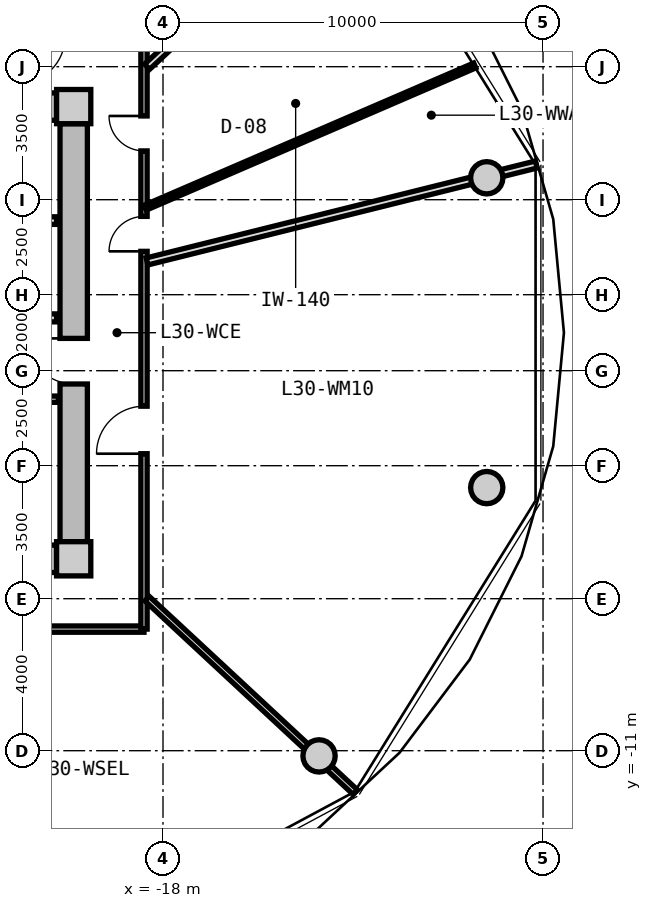
"""IFC4 building model, lengths in metres.
Left out: names, types, materials, properties, quantities, classifications, styles, units other than length and angle.
Written with IfcOpenShell. Run it as: python <this file> out.ifc"""

import sys

from ifc_helpers import new_model, si_unit, direction, frame, frame_2d, origin, origin_2d, place, context, subcontext, project, spatial, rectangle, circle, extrude, source, transform, mapped, element, fill, save


model = new_model("IFC4")
c1 = context("Model", 3, precision=1e-05, world=origin(), true_north=direction((0.0, 1.0)))
c2 = subcontext(c1, "Body", "Model", "MODEL_VIEW")
j1 = project(units=[si_unit("LENGTHUNIT", "METRE"), si_unit("PLANEANGLEUNIT", "RADIAN")], contexts=[c1])
p1 = place(None, origin())
s1 = spatial("IfcSite", under=j1, at=p1, CompositionType="ELEMENT")
p2 = place(p1, origin())
s2 = spatial("IfcBuilding", under=s1, at=p2, CompositionType="ELEMENT")
p3 = place(p2, frame((0.0, 0.0, 99.3)))
s3 = spatial("IfcBuildingStorey", under=s2, at=p3, CompositionType="ELEMENT", Elevation=99.3)
m1 = source(origin(), c2, "Body", "SweptSolid", [
    extrude(rectangle(XDim=0.9, YDim=0.9, at=origin_2d()), origin(), (0.0, 0.0, 1.0), 3.05),
])
for number, where, z_axis, x_axis in (
    (1, (-20.35, -5.95, 0.0), (0.0, 0.0, 1.0), (1.0, 0.0, 0.0)),
    (2, (-20.35, 5.95, 0.0), (0.0, 0.0, 1.0), (1.0, 0.0, 0.0)),
):
    element("IfcColumn", number, at=place(p3, frame(where, z_axis=z_axis, x_axis=x_axis)), inside=s3, PredefinedType="COLUMN", context=c2, shape_type="MappedRepresentation", body=[
        mapped(m1, transform((0.0, 0.0, 0.0), x_axis=(1.0, 0.0, 0.0), y_axis=(0.0, 1.0, 0.0), z_axis=(0.0, 0.0, 1.0), scale=1.0)),
    ])
m2 = source(origin(), c2, "Body", "SweptSolid", [
    extrude(rectangle(XDim=14.4, YDim=0.72, at=frame_2d((7.2, 0.0))), origin(), (0.0, 0.0, 1.0), 2.79),
])
for number, where, z_axis, x_axis in (
    (3, (-35.2, 5.95, 0.0), (0.0, 0.0, 1.0), (1.0, 0.0, 0.0)),
    (4, (-20.8, -5.95, 0.0), (0.0, 0.0, 1.0), (-1.0, 0.0, 0.0)),
):
    element("IfcWall", number, at=place(p3, frame(where, z_axis=z_axis, x_axis=x_axis)), inside=s3, PredefinedType="SHEAR", context=c2, shape_type="MappedRepresentation", body=[
        mapped(m2, transform((0.0, 0.0, 0.0), x_axis=(1.0, 0.0, 0.0), y_axis=(0.0, 1.0, 0.0), z_axis=(0.0, 0.0, 1.0), scale=1.0)),
    ])
m3 = source(origin(), c2, "Body", "SweptSolid", [
    extrude(rectangle(XDim=11.0, YDim=0.72, at=frame_2d((5.5, 0.0))), origin(), (0.0, 0.0, 1.0), 2.79),
])
p4 = place(p3, frame((-20.35, 5.5, 0.0), z_axis=(0.0, 0.0, 1.0), x_axis=(0.0, -1.0, 0.0)))
e5 = element("IfcWall", 5, at=p4, inside=s3, PredefinedType="SHEAR", context=c2, shape_type="MappedRepresentation", body=[
    mapped(m3, transform((0.0, 0.0, 0.0), x_axis=(1.0, 0.0, 0.0), y_axis=(0.0, 1.0, 0.0), z_axis=(0.0, 0.0, 1.0), scale=1.0)),
])
p5 = place(p4, frame((5.65, 0.0, 0.0)))
e6 = element("IfcOpeningElement", 6, at=p5, cuts=e5, PredefinedType="OPENING", context=c2, shape_type="SweptSolid", body=[
    extrude(rectangle(XDim=1.2, YDim=2.15, at=frame_2d((0.6, 1.075))), frame((0.0, 0.37, 0.0), z_axis=(0.0, -1.0, 0.0), x_axis=(1.0, 0.0, 0.0)), (0.0, 0.0, 1.0), 0.74),
])
m4 = source(origin(), c2, "Body", "SweptSolid", [
    extrude(circle(Radius=0.425, at=origin_2d()), origin(), (0.0, 0.0, 1.0), 3.05),
])
for number, where, z_axis, x_axis in (
    (7, (-9.481, 4.076, 0.0), (0.0, 0.0, 1.0), (1.0, 0.0, 0.0)),
    (8, (-13.894, -11.137, 0.0), (0.0, 0.0, 1.0), (1.0, 0.0, 0.0)),
    (9, (-9.481, -4.076, 0.0), (0.0, 0.0, 1.0), (1.0, 0.0, 0.0)),
):
    element("IfcColumn", number, at=place(p3, frame(where, z_axis=z_axis, x_axis=x_axis)), inside=s3, PredefinedType="COLUMN", context=c2, shape_type="MappedRepresentation", body=[
        mapped(m4, transform((0.0, 0.0, 0.0), x_axis=(1.0, 0.0, 0.0), y_axis=(0.0, 1.0, 0.0), z_axis=(0.0, 0.0, 1.0), scale=1.0)),
    ])
m5 = source(origin(), c2, "Body", "SweptSolid", [
    extrude(rectangle(XDim=3.2, YDim=0.2, at=frame_2d((1.6, 0.0))), origin(), (0.0, 0.0, 1.0), 2.775),
])
p6 = place(p3, frame((-24.0, 2.95, 0.0), z_axis=(0.0, 0.0, 1.0), x_axis=(1.0, 0.0, 0.0)))
e10 = element("IfcWall", 10, at=p6, inside=s3, PredefinedType="PARTITIONING", context=c2, shape_type="MappedRepresentation", body=[
    mapped(m5, transform((0.0, 0.0, 0.0), x_axis=(1.0, 0.0, 0.0), y_axis=(0.0, 1.0, 0.0), z_axis=(0.0, 0.0, 1.0), scale=1.0)),
])
m6 = source(origin(), c2, "Body", "SweptSolid", [
    extrude(rectangle(XDim=6.66, YDim=0.21, at=frame_2d((3.33, 0.0))), origin(), (0.0, 0.0, 1.0), 2.775),
])
p7 = place(p3, frame((-27.46, 0.39, 0.0), z_axis=(0.0, 0.0, 1.0), x_axis=(1.0, 0.0, 0.0)))
e11 = element("IfcWall", 11, at=p7, inside=s3, PredefinedType="PARTITIONING", context=c2, shape_type="MappedRepresentation", body=[
    mapped(m6, transform((0.0, 0.0, 0.0), x_axis=(1.0, 0.0, 0.0), y_axis=(0.0, 1.0, 0.0), z_axis=(0.0, 0.0, 1.0), scale=1.0)),
])
p8 = place(p7, frame((1.0, 0.0, 0.0)))
e12 = element("IfcOpeningElement", 12, at=p8, cuts=e11, PredefinedType="OPENING", context=c2, shape_type="SweptSolid", body=[
    extrude(rectangle(XDim=1.2, YDim=2.15, at=frame_2d((0.6, 1.075))), frame((0.0, 0.115, 0.0), z_axis=(0.0, -1.0, 0.0), x_axis=(1.0, 0.0, 0.0)), (0.0, 0.0, 1.0), 0.23),
])
m7 = source(origin(), c2, "Body", "SweptSolid", [
    extrude(rectangle(XDim=2.7, YDim=0.165, at=frame_2d((1.35, 0.0))), origin(), (0.0, 0.0, 1.0), 2.775),
])
p9 = place(p3, frame((-23.45, -1.75, 0.0), z_axis=(0.0, 0.0, 1.0), x_axis=(1.0, 0.0, 0.0)))
e13 = element("IfcWall", 13, at=p9, inside=s3, PredefinedType="PARTITIONING", context=c2, shape_type="MappedRepresentation", body=[
    mapped(m7, transform((0.0, 0.0, 0.0), x_axis=(1.0, 0.0, 0.0), y_axis=(0.0, 1.0, 0.0), z_axis=(0.0, 0.0, 1.0), scale=1.0)),
])
p10 = place(p9, frame((0.85, 0.0, 0.0)))
e14 = element("IfcOpeningElement", 14, at=p10, cuts=e13, PredefinedType="OPENING", context=c2, shape_type="SweptSolid", body=[
    extrude(rectangle(XDim=0.925, YDim=2.1, at=frame_2d((0.462, 1.05))), frame((0.0, 0.093, 0.0), z_axis=(0.0, -1.0, 0.0), x_axis=(1.0, 0.0, 0.0)), (0.0, 0.0, 1.0), 0.185),
])
m8 = source(origin(), c2, "Body", "SweptSolid", [
    extrude(rectangle(XDim=8.6, YDim=0.165, at=frame_2d((4.3, 0.0))), origin(), (0.0, 0.0, 1.0), 2.775),
])
p11 = place(p3, frame((-18.5, -7.8, 0.0), z_axis=(0.0, 0.0, 1.0), x_axis=(-1.0, 0.0, 0.0)))
e15 = element("IfcWall", 15, at=p11, inside=s3, PredefinedType="PARTITIONING", context=c2, shape_type="MappedRepresentation", body=[
    mapped(m8, transform((0.0, 0.0, 0.0), x_axis=(1.0, 0.0, 0.0), y_axis=(0.0, 1.0, 0.0), z_axis=(0.0, 0.0, 1.0), scale=1.0)),
])
p12 = place(p11, frame((3.775, 0.0, 0.0)))
e16 = element("IfcOpeningElement", 16, at=p12, cuts=e15, PredefinedType="OPENING", context=c2, shape_type="SweptSolid", body=[
    extrude(rectangle(XDim=1.05, YDim=2.15, at=frame_2d((0.525, 1.075))), frame((0.0, 0.093, 0.0), z_axis=(0.0, -1.0, 0.0), x_axis=(1.0, 0.0, 0.0)), (0.0, 0.0, 1.0), 0.185),
])
m9 = source(origin(), c2, "Body", "SweptSolid", [
    extrude(rectangle(XDim=15.6, YDim=0.165, at=frame_2d((7.8, 0.0))), origin(), (0.0, 0.0, 1.0), 2.775),
])
p13 = place(p3, frame((-18.5, 7.8, 0.0), z_axis=(0.0, 0.0, 1.0), x_axis=(0.0, -1.0, 0.0)))
e17 = element("IfcWall", 17, at=p13, inside=s3, PredefinedType="PARTITIONING", context=c2, shape_type="MappedRepresentation", body=[
    mapped(m9, transform((0.0, 0.0, 0.0), x_axis=(1.0, 0.0, 0.0), y_axis=(0.0, 1.0, 0.0), z_axis=(0.0, 0.0, 1.0), scale=1.0)),
])
p14 = place(p13, frame((9.734, 0.0, 0.0)))
e18 = element("IfcOpeningElement", 18, at=p14, cuts=e17, PredefinedType="OPENING", context=c2, shape_type="SweptSolid", body=[
    extrude(rectangle(XDim=1.25, YDim=2.2, at=frame_2d((0.625, 1.1))), frame((0.0, 0.093, 0.0), z_axis=(0.0, -1.0, 0.0), x_axis=(1.0, 0.0, 0.0)), (0.0, 0.0, 1.0), 0.185),
])
p15 = place(p13, frame((4.739, 0.0, 0.0)))
e19 = element("IfcOpeningElement", 19, at=p15, cuts=e17, PredefinedType="OPENING", context=c2, shape_type="SweptSolid", body=[
    extrude(rectangle(XDim=0.92, YDim=2.1, at=frame_2d((0.46, 1.05))), frame((0.0, 0.093, 0.0), z_axis=(0.0, -1.0, 0.0), x_axis=(1.0, 0.0, 0.0)), (0.0, 0.0, 1.0), 0.185),
])
p16 = place(p13, frame((2.096, 0.0, 0.0)))
e20 = element("IfcOpeningElement", 20, at=p16, cuts=e17, PredefinedType="OPENING", context=c2, shape_type="SweptSolid", body=[
    extrude(rectangle(XDim=0.92, YDim=2.1, at=frame_2d((0.46, 1.05))), frame((0.0, 0.093, 0.0), z_axis=(0.0, -1.0, 0.0), x_axis=(1.0, 0.0, 0.0)), (0.0, 0.0, 1.0), 0.185),
])
m10 = source(origin(), c2, "Body", "SweptSolid", [
    extrude(rectangle(XDim=7.482, YDim=0.165, at=frame_2d((3.741, 0.0))), origin(), (0.0, 0.0, 1.0), 2.275),
])
p17 = place(p3, frame((-18.42, -6.998, 0.0), z_axis=(0.0, 0.0, 1.0), x_axis=(0.732508698043, -0.680757671489, 0.0)))
e21 = element("IfcWall", 21, at=p17, inside=s3, PredefinedType="PARTITIONING", context=c2, shape_type="MappedRepresentation", body=[
    mapped(m10, transform((0.0, 0.0, 0.0), x_axis=(1.0, 0.0, 0.0), y_axis=(0.0, 1.0, 0.0), z_axis=(0.0, 0.0, 1.0), scale=1.0)),
])
m11 = source(origin(), c2, "Body", "SweptSolid", [
    extrude(rectangle(XDim=10.556, YDim=0.19, at=frame_2d((5.278, 0.0))), origin(), (0.0, 0.0, 1.0), 2.275),
])
p18 = place(p3, frame((-18.42, 1.875, 0.0), z_axis=(0.0, 0.0, 1.0), x_axis=(0.970363857851, 0.241648470667, 0.0)))
e22 = element("IfcWall", 22, at=p18, inside=s3, PredefinedType="PARTITIONING", context=c2, shape_type="MappedRepresentation", body=[
    mapped(m11, transform((0.0, 0.0, 0.0), x_axis=(1.0, 0.0, 0.0), y_axis=(0.0, 1.0, 0.0), z_axis=(0.0, 0.0, 1.0), scale=1.0)),
])
m12 = source(origin(), c2, "Body", "SweptSolid", [
    extrude(rectangle(XDim=7.482, YDim=0.19, at=frame_2d((3.741, 0.0))), origin(), (0.0, 0.0, 1.0), 2.275),
])
p19 = place(p3, frame((-18.42, 6.998, 0.0), z_axis=(0.0, 0.0, 1.0), x_axis=(0.732508698043, 0.680757671489, 0.0)))
e23 = element("IfcWall", 23, at=p19, inside=s3, PredefinedType="PARTITIONING", context=c2, shape_type="MappedRepresentation", body=[
    mapped(m12, transform((0.0, 0.0, 0.0), x_axis=(1.0, 0.0, 0.0), y_axis=(0.0, 1.0, 0.0), z_axis=(0.0, 0.0, 1.0), scale=1.0)),
])
m13 = source(origin(), c2, "Body", "SweptSolid", [
    extrude(rectangle(XDim=9.447, YDim=0.14, at=frame_2d((4.724, 0.0))), origin(), (0.0, 0.0, 1.0), 2.775),
])
p20 = place(p3, frame((-18.47, 3.289, 0.0), z_axis=(0.0, 0.0, 1.0), x_axis=(0.918162367414, 0.396204324894, 0.0)))
e24 = element("IfcWall", 24, at=p20, inside=s3, PredefinedType="PARTITIONING", context=c2, shape_type="MappedRepresentation", body=[
    mapped(m13, transform((0.0, 0.0, 0.0), x_axis=(1.0, 0.0, 0.0), y_axis=(0.0, 1.0, 0.0), z_axis=(0.0, 0.0, 1.0), scale=1.0)),
])
m14 = source(origin(), c2, "Body", "SweptSolid", [
    extrude(rectangle(XDim=1.2, YDim=2.15, at=frame_2d((0.6, 1.075))), frame((0.0, 0.025, 0.0), z_axis=(0.0, -1.0, 0.0), x_axis=(1.0, 0.0, 0.0)), (0.0, 0.0, 1.0), 0.05),
])
p21 = place(p5, frame((1.2, 0.0, 0.0), z_axis=(0.0, 0.0, 1.0), x_axis=(-1.0, 0.0, 0.0)))
e25 = element("IfcDoor", 25, at=p21, inside=s3, OperationType="SINGLE_SWING_RIGHT", PredefinedType="DOOR", context=c2, shape_type="MappedRepresentation", body=[
    mapped(m14, transform((0.0, 0.0, 0.0), x_axis=(1.0, 0.0, 0.0), y_axis=(0.0, 1.0, 0.0), z_axis=(0.0, 0.0, 1.0), scale=1.0)),
])
fill(e6, e25)
m15 = source(origin(), c2, "Body", "SweptSolid", [
    extrude(rectangle(XDim=1.25, YDim=2.2, at=frame_2d((0.625, 1.1))), frame((0.0, 0.025, 0.0), z_axis=(0.0, -1.0, 0.0), x_axis=(1.0, 0.0, 0.0)), (0.0, 0.0, 1.0), 0.05),
])
p22 = place(p14, frame((1.25, 0.0, 0.0), z_axis=(0.0, 0.0, 1.0), x_axis=(-1.0, 0.0, 0.0)))
e26 = element("IfcDoor", 26, at=p22, inside=s3, OperationType="SINGLE_SWING_LEFT", PredefinedType="DOOR", context=c2, shape_type="MappedRepresentation", body=[
    mapped(m15, transform((0.0, 0.0, 0.0), x_axis=(1.0, 0.0, 0.0), y_axis=(0.0, 1.0, 0.0), z_axis=(0.0, 0.0, 1.0), scale=1.0)),
])
fill(e18, e26)
m16 = source(origin(), c2, "Body", "SweptSolid", [
    extrude(rectangle(XDim=0.92, YDim=2.1, at=frame_2d((0.46, 1.05))), frame((0.0, 0.025, 0.0), z_axis=(0.0, -1.0, 0.0), x_axis=(1.0, 0.0, 0.0)), (0.0, 0.0, 1.0), 0.05),
])
p23 = place(p15, frame((0.92, 0.0, 0.0), z_axis=(0.0, 0.0, 1.0), x_axis=(-1.0, 0.0, 0.0)))
e27 = element("IfcDoor", 27, at=p23, inside=s3, OperationType="SINGLE_SWING_LEFT", PredefinedType="DOOR", context=c2, shape_type="MappedRepresentation", body=[
    mapped(m16, transform((0.0, 0.0, 0.0), x_axis=(1.0, 0.0, 0.0), y_axis=(0.0, 1.0, 0.0), z_axis=(0.0, 0.0, 1.0), scale=1.0)),
])
fill(e19, e27)
p24 = place(p16, frame((0.92, 0.0, 0.0), z_axis=(0.0, 0.0, 1.0), x_axis=(-1.0, 0.0, 0.0)))
e28 = element("IfcDoor", 28, at=p24, inside=s3, OperationType="SINGLE_SWING_RIGHT", PredefinedType="DOOR", context=c2, shape_type="MappedRepresentation", body=[
    mapped(m16, transform((0.0, 0.0, 0.0), x_axis=(1.0, 0.0, 0.0), y_axis=(0.0, 1.0, 0.0), z_axis=(0.0, 0.0, 1.0), scale=1.0)),
])
fill(e20, e28)
save(model, sys.argv[1])
